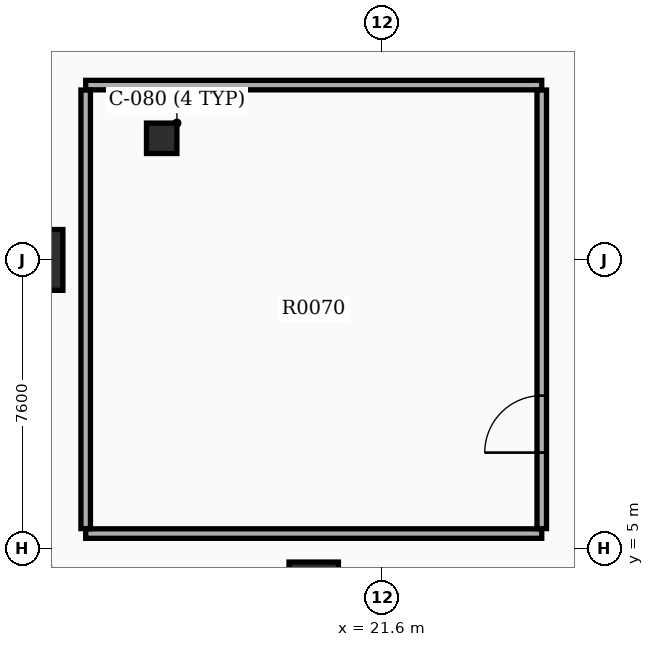
"""IFC4 building model, lengths in metres.
Left out: names, types, materials, properties, quantities, classifications, styles, units other than length and angle.
Written with IfcOpenShell. Run it as: python <this file> out.ifc"""

import sys

from ifc_helpers import new_model, si_unit, direction, frame, frame_2d, origin, origin_2d, place, context, subcontext, project, spatial, rectangle, extrude, element, fill, save


model = new_model("IFC4")
c1 = context("Model", 3, precision=1e-05, world=origin(), true_north=direction((0.0, 1.0)))
c2 = subcontext(c1, "Body", "Model", "MODEL_VIEW")
j1 = project(units=[si_unit("LENGTHUNIT", "METRE"), si_unit("PLANEANGLEUNIT", "RADIAN")], contexts=[c1])
p1 = place(None, origin())
s1 = spatial("IfcSite", under=j1, at=p1, CompositionType="ELEMENT")
p2 = place(p1, origin())
s2 = spatial("IfcBuilding", under=s1, at=p2, CompositionType="ELEMENT")
p3 = place(p2, frame((0.0, 0.0, -5.2)))
s3 = spatial("IfcBuildingStorey", under=s2, at=p3, CompositionType="ELEMENT", Elevation=-5.2)
p4 = place(p3, frame((15.8, 15.8, 0.0), z_axis=(0.0, 0.0, 1.0), x_axis=(1.0, 0.0, 0.0)))
e1 = element("IfcColumn", 1, at=p4, inside=s3, PredefinedType="COLUMN", context=c2, shape_type="SweptSolid", body=[
    extrude(rectangle(XDim=0.8, YDim=0.8, at=origin_2d()), origin(), (0.0, 0.0, 1.0), 5.2),
])
p5 = place(p3, frame((12.4, 12.6, 0.0), z_axis=(0.0, 0.0, 1.0), x_axis=(1.0, 0.0, 0.0)))
e2 = element("IfcColumn", 2, at=p5, inside=s3, PredefinedType="COLUMN", context=c2, shape_type="SweptSolid", body=[
    extrude(rectangle(XDim=1.6, YDim=1.6, at=origin_2d()), origin(), (0.0, 0.0, 1.0), 5.2),
])
p6 = place(p3, frame((19.8, 4.0, 0.0), z_axis=(0.0, 0.0, 1.0), x_axis=(1.0, 0.0, 0.0)))
e3 = element("IfcColumn", 3, at=p6, inside=s3, PredefinedType="COLUMN", context=c2, shape_type="SweptSolid", body=[
    extrude(rectangle(XDim=1.3, YDim=1.3, at=origin_2d()), origin(), (0.0, 0.0, 1.0), 5.2),
])
for number, where, z_axis, x_axis in (
    (4, (13.8, 5.4, 0.0), (0.0, 0.0, 1.0), (1.0, 0.0, 0.0)),
    (5, (13.8, 17.2, 0.0), (0.0, 0.0, 1.0), (1.0, 0.0, 0.0)),
):
    element("IfcWall", number, at=place(p3, frame(where, z_axis=z_axis, x_axis=x_axis)), inside=s3, PredefinedType="SOLIDWALL", context=c2, shape_type="SweptSolid", body=[
        extrude(rectangle(XDim=12.0, YDim=0.25, at=frame_2d((6.0, 0.0))), origin(), (0.0, 0.0, 1.0), 3.97),
    ])
p7 = place(p3, frame((13.8, 5.53, 0.0), z_axis=(0.0, 0.0, 1.0), x_axis=(0.0, 1.0, 0.0)))
e6 = element("IfcWall", 6, at=p7, inside=s3, PredefinedType="SOLIDWALL", context=c2, shape_type="SweptSolid", body=[
    extrude(rectangle(XDim=11.54, YDim=0.25, at=frame_2d((5.77, 0.0))), origin(), (0.0, 0.0, 1.0), 3.97),
])
p8 = place(p3, frame((25.8, 5.53, 0.0), z_axis=(0.0, 0.0, 1.0), x_axis=(0.0, 1.0, 0.0)))
e7 = element("IfcWall", 7, at=p8, inside=s3, PredefinedType="SOLIDWALL", context=c2, shape_type="SweptSolid", body=[
    extrude(rectangle(XDim=11.54, YDim=0.25, at=frame_2d((5.77, 0.0))), origin(), (0.0, 0.0, 1.0), 3.97),
])
p9 = place(p8, frame((2.0, 0.0, 0.0)))
e8 = element("IfcOpeningElement", 8, at=p9, cuts=e7, PredefinedType="OPENING", context=c2, shape_type="SweptSolid", body=[
    extrude(rectangle(XDim=1.5, YDim=2.15, at=frame_2d((0.75, 1.075))), frame((0.0, 0.135, 0.0), z_axis=(0.0, -1.0, 0.0), x_axis=(1.0, 0.0, 0.0)), (0.0, 0.0, 1.0), 0.27),
])
p10 = place(p9, origin())
e9 = element("IfcDoor", 9, at=p10, inside=s3, OperationType="DOUBLE_DOOR_SINGLE_SWING", PredefinedType="DOOR", context=c2, shape_type="SweptSolid", body=[
    extrude(rectangle(XDim=1.5, YDim=2.15, at=frame_2d((0.75, 1.075))), frame((0.0, 0.025, 0.0), z_axis=(0.0, -1.0, 0.0), x_axis=(1.0, 0.0, 0.0)), (0.0, 0.0, 1.0), 0.05),
])
fill(e8, e9)
save(model, sys.argv[1])
